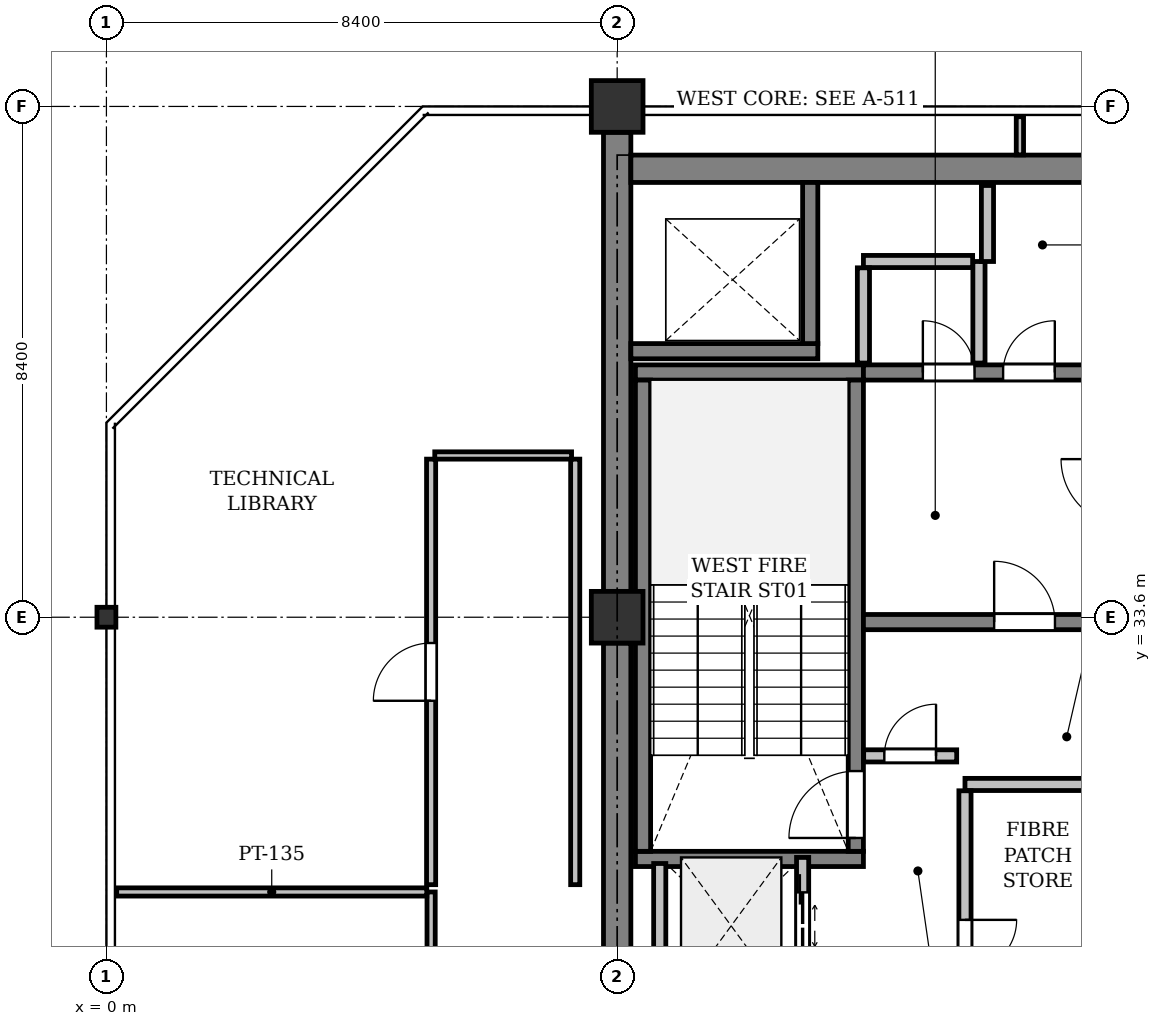
"""IFC4 building model, lengths in metres.
Left out: names, types, materials, properties, quantities, classifications, styles, units other than length and angle.
Written with IfcOpenShell. Run it as: python <this file> out.ifc"""

import sys

from ifc_helpers import new_model, si_unit, direction, frame, frame_2d, origin, origin_2d, place, context, subcontext, project, spatial, rectangle, i_section, extrude, element, fill, save


model = new_model("IFC4")
c1 = context("Model", 3, precision=1e-05, world=origin(), true_north=direction((0.0, 1.0)))
c2 = subcontext(c1, "Body", "Model", "MODEL_VIEW")
j1 = project(units=[si_unit("LENGTHUNIT", "METRE"), si_unit("PLANEANGLEUNIT", "RADIAN")], contexts=[c1])
p1 = place(None, origin())
s1 = spatial("IfcSite", under=j1, at=p1, CompositionType="ELEMENT")
p2 = place(p1, origin())
s2 = spatial("IfcBuilding", under=s1, at=p2, CompositionType="ELEMENT")
p3 = place(p2, frame((0.0, 0.0, 302.2)))
s3 = spatial("IfcBuildingStorey", under=s2, at=p3, CompositionType="ELEMENT", Elevation=302.2)
p4 = place(p3, frame((0.0, 33.6, 0.0), z_axis=(0.0, 0.0, 1.0), x_axis=(1.0, 0.0, 0.0)))
e1 = element("IfcColumn", 1, at=p4, inside=s3, PredefinedType="COLUMN", context=c2, shape_type="SweptSolid", body=[
    extrude(i_section(OverallWidth=0.311, OverallDepth=0.327, WebThickness=0.016, FlangeThickness=0.025, FilletRadius=0.017, at=origin_2d()), origin(), (0.0, 0.0, 1.0), 4.0),
])
for number, where, z_axis, x_axis in (
    (2, (8.4, 33.6, 0.0), (0.0, 0.0, 1.0), (1.0, 0.0, 0.0)),
    (3, (8.4, 42.0, 0.0), (0.0, 0.0, 1.0), (1.0, 0.0, 0.0)),
):
    element("IfcColumn", number, at=place(p3, frame(where, z_axis=z_axis, x_axis=x_axis)), inside=s3, PredefinedType="COLUMN", context=c2, shape_type="SweptSolid", body=[
        extrude(rectangle(XDim=0.85, YDim=0.85, at=origin_2d()), origin(), (0.0, 0.0, 1.0), 4.0),
    ])
for number, where, z_axis, x_axis in (
    (4, (8.4, 25.625, 0.0), (0.0, 0.0, 1.0), (0.0, 1.0, 0.0)),
    (5, (8.4, 34.025, 0.0), (0.0, 0.0, 1.0), (0.0, 1.0, 0.0)),
):
    element("IfcWall", number, at=place(p3, frame(where, z_axis=z_axis, x_axis=x_axis)), inside=s3, PredefinedType="SHEAR", context=c2, shape_type="SweptSolid", body=[
        extrude(rectangle(XDim=7.55, YDim=0.45, at=frame_2d((3.775, 0.0))), origin(), (0.0, 0.0, 1.0), 3.725),
    ])
p5 = place(p3, frame((8.625, 40.975, 0.0), z_axis=(0.0, 0.0, 1.0), x_axis=(1.0, 0.0, 0.0)))
e6 = element("IfcWall", 6, at=p5, inside=s3, PredefinedType="SHEAR", context=c2, shape_type="SweptSolid", body=[
    extrude(rectangle(XDim=7.95, YDim=0.45, at=frame_2d((3.975, 0.0))), origin(), (0.0, 0.0, 1.0), 3.725),
])
for number, where, z_axis, x_axis in (
    (7, (12.45, 29.625, 0.0), (0.0, 0.0, 1.0), (-1.0, 0.0, 0.0)),
    (8, (12.45, 37.625, 0.0), (0.0, 0.0, 1.0), (-1.0, 0.0, 0.0)),
):
    element("IfcWall", number, at=place(p3, frame(where, z_axis=z_axis, x_axis=x_axis)), inside=s3, PredefinedType="SHEAR", context=c2, shape_type="SweptSolid", body=[
        extrude(rectangle(XDim=3.75, YDim=0.25, at=frame_2d((1.875, 0.0))), origin(), (0.0, 0.0, 1.0), 3.725),
    ])
p6 = place(p3, frame((12.325, 29.75, 0.0), z_axis=(0.0, 0.0, 1.0), x_axis=(0.0, 1.0, 0.0)))
e9 = element("IfcWall", 9, at=p6, inside=s3, PredefinedType="SHEAR", context=c2, shape_type="SweptSolid", body=[
    extrude(rectangle(XDim=7.75, YDim=0.25, at=frame_2d((3.875, 0.0))), origin(), (0.0, 0.0, 1.0), 3.725),
])
p7 = place(p6, frame((0.22, 0.0, 0.0)))
e10 = element("IfcOpeningElement", 10, at=p7, cuts=e9, PredefinedType="OPENING", context=c2, shape_type="SweptSolid", body=[
    extrude(rectangle(XDim=1.1, YDim=2.15, at=frame_2d((0.55, 1.075))), frame((0.0, 0.135, 0.0), z_axis=(0.0, -1.0, 0.0), x_axis=(1.0, 0.0, 0.0)), (0.0, 0.0, 1.0), 0.27),
])
p8 = place(p3, frame((8.825, 29.75, 0.0), z_axis=(0.0, 0.0, 1.0), x_axis=(0.0, 1.0, 0.0)))
e11 = element("IfcWall", 11, at=p8, inside=s3, PredefinedType="SHEAR", context=c2, shape_type="SweptSolid", body=[
    extrude(rectangle(XDim=7.75, YDim=0.25, at=frame_2d((3.875, 0.0))), origin(), (0.0, 0.0, 1.0), 3.725),
])
p9 = place(p3, frame((8.625, 37.975, 0.0), z_axis=(0.0, 0.0, 1.0), x_axis=(1.0, 0.0, 0.0)))
e12 = element("IfcWall", 12, at=p9, inside=s3, PredefinedType="SHEAR", context=c2, shape_type="SweptSolid", body=[
    extrude(rectangle(XDim=3.075, YDim=0.25, at=frame_2d((1.538, 0.0))), origin(), (0.0, 0.0, 1.0), 3.725),
])
p10 = place(p3, frame((11.575, 38.1, 0.0), z_axis=(0.0, 0.0, 1.0), x_axis=(0.0, 1.0, 0.0)))
e13 = element("IfcWall", 13, at=p10, inside=s3, PredefinedType="SHEAR", context=c2, shape_type="SweptSolid", body=[
    extrude(rectangle(XDim=2.65, YDim=0.25, at=frame_2d((1.325, 0.0))), origin(), (0.0, 0.0, 1.0), 3.725),
])
p11 = place(p3, frame((12.45, 33.52, 0.0), z_axis=(0.0, 0.0, 1.0), x_axis=(1.0, 0.0, 0.0)))
e14 = element("IfcWall", 14, at=p11, inside=s3, PredefinedType="SHEAR", context=c2, shape_type="SweptSolid", body=[
    extrude(rectangle(XDim=3.925, YDim=0.25, at=frame_2d((1.962, 0.0))), origin(), (0.0, 0.0, 1.0), 3.725),
])
p12 = place(p11, frame((2.15, 0.0, 0.0)))
e15 = element("IfcOpeningElement", 15, at=p12, cuts=e14, PredefinedType="OPENING", context=c2, shape_type="SweptSolid", body=[
    extrude(rectangle(XDim=1.0, YDim=2.15, at=frame_2d((0.5, 1.075))), frame((0.0, 0.135, 0.0), z_axis=(0.0, -1.0, 0.0), x_axis=(1.0, 0.0, 0.0)), (0.0, 0.0, 1.0), 0.27),
])
p13 = place(p3, frame((12.45, 37.625, 0.0), z_axis=(0.0, 0.0, 1.0), x_axis=(1.0, 0.0, 0.0)))
e16 = element("IfcWall", 16, at=p13, inside=s3, PredefinedType="SHEAR", context=c2, shape_type="SweptSolid", body=[
    extrude(rectangle(XDim=4.125, YDim=0.25, at=frame_2d((2.062, 0.0))), origin(), (0.0, 0.0, 1.0), 3.725),
])
p14 = place(p13, frame((0.978, 0.0, 0.0)))
e17 = element("IfcOpeningElement", 17, at=p14, cuts=e16, PredefinedType="OPENING", context=c2, shape_type="SweptSolid", body=[
    extrude(rectangle(XDim=0.85, YDim=2.15, at=frame_2d((0.425, 1.075))), frame((0.0, 0.135, 0.0), z_axis=(0.0, -1.0, 0.0), x_axis=(1.0, 0.0, 0.0)), (0.0, 0.0, 1.0), 0.27),
])
p15 = place(p13, frame((2.298, 0.0, 0.0)))
e18 = element("IfcOpeningElement", 18, at=p15, cuts=e16, PredefinedType="OPENING", context=c2, shape_type="SweptSolid", body=[
    extrude(rectangle(XDim=0.85, YDim=2.15, at=frame_2d((0.425, 1.075))), frame((0.0, 0.135, 0.0), z_axis=(0.0, -1.0, 0.0), x_axis=(1.0, 0.0, 0.0)), (0.0, 0.0, 1.0), 0.27),
])
p16 = place(p3, frame((11.45, 27.4, 0.0), z_axis=(0.0, 0.0, 1.0), x_axis=(0.0, 1.0, 0.0)))
e19 = element("IfcWall", 19, at=p16, inside=s3, PredefinedType="PARTITIONING", context=c2, shape_type="SweptSolid", body=[
    extrude(rectangle(XDim=2.25, YDim=0.2, at=frame_2d((1.125, 0.0))), origin(), (0.0, 0.0, 1.0), 3.725),
])
p17 = place(p16, frame((0.575, 0.0, 0.0)))
e20 = element("IfcOpeningElement", 20, at=p17, cuts=e19, PredefinedType="OPENING", context=c2, shape_type="SweptSolid", body=[
    extrude(rectangle(XDim=1.1, YDim=2.2, at=frame_2d((0.55, 1.1))), frame((0.0, 0.11, 0.0), z_axis=(0.0, -1.0, 0.0), x_axis=(1.0, 0.0, 0.0)), (0.0, 0.0, 1.0), 0.22),
])
p18 = place(p3, frame((9.1, 27.5, 0.0), z_axis=(0.0, 0.0, 1.0), x_axis=(0.0, 1.0, 0.0)))
e21 = element("IfcWall", 21, at=p18, inside=s3, PredefinedType="PARTITIONING", context=c2, shape_type="SweptSolid", body=[
    extrude(rectangle(XDim=2.05, YDim=0.2, at=frame_2d((1.025, 0.0))), origin(), (0.0, 0.0, 1.0), 3.725),
])
p19 = place(p3, frame((16.346, 30.85, 0.0), z_axis=(0.0, 0.0, 1.0), x_axis=(-1.0, 0.0, 0.0)))
e22 = element("IfcWall", 22, at=p19, inside=s3, PredefinedType="PARTITIONING", context=c2, shape_type="SweptSolid", body=[
    extrude(rectangle(XDim=2.226, YDim=0.2, at=frame_2d((1.113, 0.0))), origin(), (0.0, 0.0, 1.0), 3.725),
])
p20 = place(p3, frame((14.12, 30.746, 0.0), z_axis=(0.0, 0.0, 1.0), x_axis=(0.0, -1.0, 0.0)))
e23 = element("IfcWall", 23, at=p20, inside=s3, PredefinedType="PARTITIONING", context=c2, shape_type="SweptSolid", body=[
    extrude(rectangle(XDim=5.096, YDim=0.2, at=frame_2d((2.548, 0.0))), origin(), (0.0, 0.0, 1.0), 3.725),
])
p21 = place(p20, frame((2.123, 0.0, 0.0)))
e24 = element("IfcOpeningElement", 24, at=p21, cuts=e23, PredefinedType="OPENING", context=c2, shape_type="SweptSolid", body=[
    extrude(rectangle(XDim=0.85, YDim=2.15, at=frame_2d((0.425, 1.075))), frame((0.0, 0.11, 0.0), z_axis=(0.0, -1.0, 0.0), x_axis=(1.0, 0.0, 0.0)), (0.0, 0.0, 1.0), 0.22),
])
p22 = place(p3, frame((12.454, 31.32, 0.0), z_axis=(0.0, 0.0, 1.0), x_axis=(0.999999949061, -0.000319182876, 0.0)))
e25 = element("IfcWall", 25, at=p22, inside=s3, PredefinedType="PARTITIONING", context=c2, shape_type="SweptSolid", body=[
    extrude(rectangle(XDim=1.53, YDim=0.2, at=frame_2d((0.765, 0.0))), origin(), (0.0, 0.0, 1.0), 3.725),
])
p23 = place(p22, frame((0.34, 0.0, 0.0)))
e26 = element("IfcOpeningElement", 26, at=p23, cuts=e25, PredefinedType="OPENING", context=c2, shape_type="SweptSolid", body=[
    extrude(rectangle(XDim=0.85, YDim=2.15, at=frame_2d((0.425, 1.075))), frame((0.0, 0.11, 0.0), z_axis=(0.0, -1.0, 0.0), x_axis=(1.0, 0.0, 0.0)), (0.0, 0.0, 1.0), 0.22),
])
p24 = place(p3, frame((14.35, 37.78, 0.0), z_axis=(0.0, 0.0, 1.0), x_axis=(0.0, 1.0, 0.0)))
e27 = element("IfcWall", 27, at=p24, inside=s3, PredefinedType="PARTITIONING", context=c2, shape_type="SweptSolid", body=[
    extrude(rectangle(XDim=1.67, YDim=0.2, at=frame_2d((0.835, 0.0))), origin(), (0.0, 0.0, 1.0), 2.775),
])
p25 = place(p3, frame((14.246, 39.45, 0.0), z_axis=(0.0, 0.0, 1.0), x_axis=(-1.0, 0.0, 0.0)))
e28 = element("IfcWall", 28, at=p25, inside=s3, PredefinedType="PARTITIONING", context=c2, shape_type="SweptSolid", body=[
    extrude(rectangle(XDim=1.796, YDim=0.2, at=frame_2d((0.898, 0.0))), origin(), (0.0, 0.0, 1.0), 2.775),
])
p26 = place(p3, frame((12.45, 39.346, 0.0), z_axis=(0.0, 0.0, 1.0), x_axis=(0.0, -1.0, 0.0)))
e29 = element("IfcWall", 29, at=p26, inside=s3, PredefinedType="PARTITIONING", context=c2, shape_type="SweptSolid", body=[
    extrude(rectangle(XDim=1.566, YDim=0.2, at=frame_2d((0.783, 0.0))), origin(), (0.0, 0.0, 1.0), 2.775),
])
p27 = place(p3, frame((14.49, 40.7, 0.0), z_axis=(0.0, 0.0, 1.0), x_axis=(0.0, -1.0, 0.0)))
e30 = element("IfcWall", 30, at=p27, inside=s3, PredefinedType="PARTITIONING", context=c2, shape_type="SweptSolid", body=[
    extrude(rectangle(XDim=1.25, YDim=0.2, at=frame_2d((0.625, 0.0))), origin(), (0.0, 0.0, 1.0), 2.775),
])
p28 = place(p3, frame((5.34, 24.267, 0.0), z_axis=(0.0, 0.0, 1.0), x_axis=(0.0, 1.0, 0.0)))
e31 = element("IfcWall", 31, at=p28, inside=s3, PredefinedType="PARTITIONING", context=c2, shape_type="SweptSolid", body=[
    extrude(rectangle(XDim=4.815, YDim=0.135, at=frame_2d((2.407, 0.0))), origin(), (0.0, 0.0, 1.0), 3.271),
])
p29 = place(p28, frame((1.933, 0.0, 0.0)))
e32 = element("IfcOpeningElement", 32, at=p29, cuts=e31, PredefinedType="OPENING", context=c2, shape_type="SweptSolid", body=[
    extrude(rectangle(XDim=0.95, YDim=2.15, at=frame_2d((0.475, 1.075))), frame((0.0, 0.077, 0.0), z_axis=(0.0, -1.0, 0.0), x_axis=(1.0, 0.0, 0.0)), (0.0, 0.0, 1.0), 0.155),
])
p30 = place(p3, frame((5.269, 29.082, 0.0), z_axis=(0.0, 0.0, 1.0), x_axis=(-1.0, 0.0, 0.0)))
e33 = element("IfcWall", 33, at=p30, inside=s3, PredefinedType="PARTITIONING", context=c2, shape_type="SweptSolid", body=[
    extrude(rectangle(XDim=5.1, YDim=0.135, at=frame_2d((2.55, 0.0))), origin(), (0.0, 0.0, 1.0), 3.421),
])
p31 = place(p3, frame((7.71, 36.2, 0.0), z_axis=(0.0, 0.0, 1.0), x_axis=(0.0, -1.0, 0.0)))
e34 = element("IfcWall", 34, at=p31, inside=s3, PredefinedType="PARTITIONING", context=c2, shape_type="SweptSolid", body=[
    extrude(rectangle(XDim=6.998, YDim=0.15, at=frame_2d((3.499, 0.0))), origin(), (0.0, 0.0, 1.0), 3.271),
])
p32 = place(p3, frame((15.023, 41.204, 0.0), z_axis=(0.0, 0.0, 1.0), x_axis=(0.0, 1.0, 0.0)))
e35 = element("IfcWall", 35, at=p32, inside=s3, PredefinedType="PARTITIONING", context=c2, shape_type="SweptSolid", body=[
    extrude(rectangle(XDim=0.627, YDim=0.12, at=frame_2d((0.313, 0.0))), origin(), (0.0, 0.0, 1.0), 3.725),
])
p33 = place(p3, frame((5.34, 29.202, 0.0), z_axis=(0.0, 0.0, 1.0), x_axis=(0.0, 1.0, 0.0)))
e36 = element("IfcWall", 36, at=p33, inside=s3, PredefinedType="PARTITIONING", context=c2, shape_type="SweptSolid", body=[
    extrude(rectangle(XDim=6.998, YDim=0.15, at=frame_2d((3.499, 0.0))), origin(), (0.0, 0.0, 1.0), 3.271),
])
p34 = place(p33, frame((3.024, 0.0, 0.0)))
e37 = element("IfcOpeningElement", 37, at=p34, cuts=e36, PredefinedType="OPENING", context=c2, shape_type="SweptSolid", body=[
    extrude(rectangle(XDim=0.95, YDim=2.15, at=frame_2d((0.475, 1.075))), frame((0.0, 0.085, 0.0), z_axis=(0.0, -1.0, 0.0), x_axis=(1.0, 0.0, 0.0)), (0.0, 0.0, 1.0), 0.17),
])
p35 = place(p3, frame((5.4, 36.26, 0.0), z_axis=(0.0, 0.0, 1.0), x_axis=(1.0, 0.0, 0.0)))
e38 = element("IfcWall", 38, at=p35, inside=s3, PredefinedType="PARTITIONING", context=c2, shape_type="SweptSolid", body=[
    extrude(rectangle(XDim=2.25, YDim=0.12, at=frame_2d((1.125, 0.0))), origin(), (0.0, 0.0, 1.0), 3.725),
])
p36 = place(p7, origin())
e39 = element("IfcDoor", 39, at=p36, inside=s3, OperationType="SINGLE_SWING_LEFT", PredefinedType="DOOR", context=c2, shape_type="SweptSolid", body=[
    extrude(rectangle(XDim=1.1, YDim=2.15, at=frame_2d((0.55, 1.075))), frame((0.0, 0.025, 0.0), z_axis=(0.0, -1.0, 0.0), x_axis=(1.0, 0.0, 0.0)), (0.0, 0.0, 1.0), 0.05),
])
fill(e10, e39)
p37 = place(p12, origin())
e40 = element("IfcDoor", 40, at=p37, inside=s3, OperationType="SINGLE_SWING_LEFT", PredefinedType="DOOR", context=c2, shape_type="SweptSolid", body=[
    extrude(rectangle(XDim=1.0, YDim=2.15, at=frame_2d((0.5, 1.075))), frame((0.0, 0.025, 0.0), z_axis=(0.0, -1.0, 0.0), x_axis=(1.0, 0.0, 0.0)), (0.0, 0.0, 1.0), 0.05),
])
fill(e15, e40)
p38 = place(p17, origin())
e41 = element("IfcDoor", 41, at=p38, inside=s3, OperationType="DOUBLE_DOOR_SLIDING", PredefinedType="DOOR", context=c2, shape_type="SweptSolid", body=[
    extrude(rectangle(XDim=1.1, YDim=2.2, at=frame_2d((0.55, 1.1))), frame((0.0, 0.025, 0.0), z_axis=(0.0, -1.0, 0.0), x_axis=(1.0, 0.0, 0.0)), (0.0, 0.0, 1.0), 0.05),
])
fill(e20, e41)
p39 = place(p21, origin())
e42 = element("IfcDoor", 42, at=p39, inside=s3, OperationType="SINGLE_SWING_LEFT", PredefinedType="DOOR", context=c2, shape_type="SweptSolid", body=[
    extrude(rectangle(XDim=0.85, YDim=2.15, at=frame_2d((0.425, 1.075))), frame((0.0, 0.025, 0.0), z_axis=(0.0, -1.0, 0.0), x_axis=(1.0, 0.0, 0.0)), (0.0, 0.0, 1.0), 0.05),
])
fill(e24, e42)
p40 = place(p23, origin())
e43 = element("IfcDoor", 43, at=p40, inside=s3, OperationType="SINGLE_SWING_RIGHT", PredefinedType="DOOR", context=c2, shape_type="SweptSolid", body=[
    extrude(rectangle(XDim=0.85, YDim=2.15, at=frame_2d((0.425, 1.075))), frame((0.0, 0.025, 0.0), z_axis=(0.0, -1.0, 0.0), x_axis=(1.0, 0.0, 0.0)), (0.0, 0.0, 1.0), 0.05),
])
fill(e26, e43)
p41 = place(p14, origin())
e44 = element("IfcDoor", 44, at=p41, inside=s3, OperationType="SINGLE_SWING_LEFT", PredefinedType="DOOR", context=c2, shape_type="SweptSolid", body=[
    extrude(rectangle(XDim=0.85, YDim=2.15, at=frame_2d((0.425, 1.075))), frame((0.0, 0.025, 0.0), z_axis=(0.0, -1.0, 0.0), x_axis=(1.0, 0.0, 0.0)), (0.0, 0.0, 1.0), 0.05),
])
fill(e17, e44)
p42 = place(p15, origin())
e45 = element("IfcDoor", 45, at=p42, inside=s3, OperationType="SINGLE_SWING_RIGHT", PredefinedType="DOOR", context=c2, shape_type="SweptSolid", body=[
    extrude(rectangle(XDim=0.85, YDim=2.15, at=frame_2d((0.425, 1.075))), frame((0.0, 0.025, 0.0), z_axis=(0.0, -1.0, 0.0), x_axis=(1.0, 0.0, 0.0)), (0.0, 0.0, 1.0), 0.05),
])
fill(e18, e45)
p43 = place(p34, origin())
e46 = element("IfcDoor", 46, at=p43, inside=s3, OperationType="SINGLE_SWING_LEFT", PredefinedType="DOOR", context=c2, shape_type="SweptSolid", body=[
    extrude(rectangle(XDim=0.95, YDim=2.15, at=frame_2d((0.475, 1.075))), frame((0.0, 0.025, 0.0), z_axis=(0.0, -1.0, 0.0), x_axis=(1.0, 0.0, 0.0)), (0.0, 0.0, 1.0), 0.05),
])
fill(e37, e46)
save(model, sys.argv[1])
